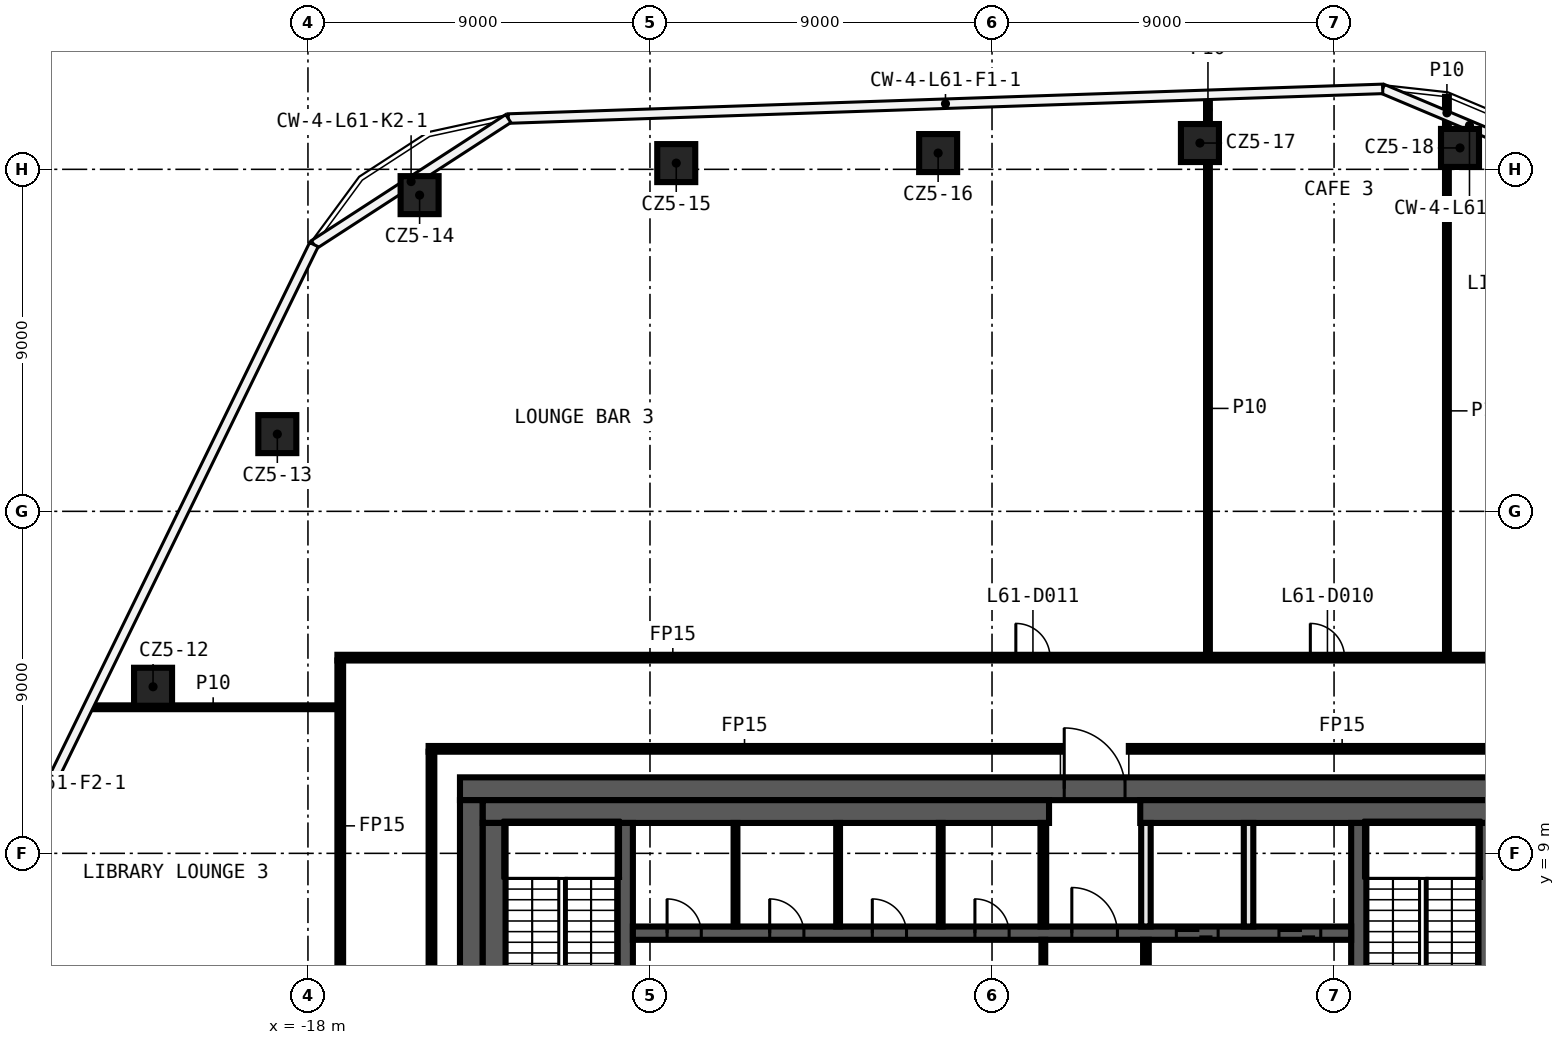
"""IFC4 building model, lengths in metres.
Left out: names, types, materials, properties, quantities, classifications, styles, units other than length and angle.
Written with IfcOpenShell. Run it as: python <this file> out.ifc"""

import sys

from ifc_helpers import new_model, si_unit, direction, frame, frame_2d, origin, origin_2d, place, context, subcontext, project, spatial, rectangle, extrude, element, fill, save


model = new_model("IFC4")
c1 = context("Model", 3, precision=1e-05, world=origin(), true_north=direction((0.0, 1.0)))
c2 = subcontext(c1, "Body", "Model", "MODEL_VIEW")
j1 = project(units=[si_unit("LENGTHUNIT", "METRE"), si_unit("PLANEANGLEUNIT", "RADIAN")], contexts=[c1])
p1 = place(None, origin())
s1 = spatial("IfcSite", under=j1, at=p1, CompositionType="ELEMENT")
p2 = place(p1, origin())
s2 = spatial("IfcBuilding", under=s1, at=p2, CompositionType="ELEMENT")
p3 = place(p2, frame((0.0, 0.0, 289.2)))
s3 = spatial("IfcBuildingStorey", under=s2, at=p3, CompositionType="ELEMENT", Elevation=289.2)
for number, where, z_axis, x_axis in (
    (1, (-22.076, 13.384, 0.0), (0.0, 0.0, 1.0), (1.0, 0.0, 0.0)),
    (2, (-18.806, 20.032, 0.0), (0.0, 0.0, 1.0), (1.0, 0.0, 0.0)),
    (3, (-15.062, 26.321, 0.0), (0.0, 0.0, 1.0), (1.0, 0.0, 0.0)),
    (4, (-8.309, 27.164, 0.0), (0.0, 0.0, 1.0), (1.0, 0.0, 0.0)),
    (5, (-1.418, 27.428, 0.0), (0.0, 0.0, 1.0), (1.0, 0.0, 0.0)),
    (6, (5.471, 27.692, 0.0), (0.0, 0.0, 1.0), (1.0, 0.0, 0.0)),
    (7, (12.314, 27.563, 0.0), (0.0, 0.0, 1.0), (1.0, 0.0, 0.0)),
):
    element("IfcColumn", number, at=place(p3, frame(where, z_axis=z_axis, x_axis=x_axis)), inside=s3, PredefinedType="COLUMN", context=c2, shape_type="SweptSolid", body=[
        extrude(rectangle(XDim=1.0, YDim=1.0, at=origin_2d()), origin(), (0.0, 0.0, 1.0), 4.62),
    ])
p4 = place(p3, frame((-14.825, 11.75, 0.0), z_axis=(0.0, 0.0, 1.0), x_axis=(1.0, 0.0, 0.0)))
e8 = element("IfcWall", 8, at=p4, inside=s3, PredefinedType="PARTITIONING", context=c2, shape_type="SweptSolid", body=[
    extrude(rectangle(XDim=16.625, YDim=0.15, at=frame_2d((8.312, 0.0))), origin(), (0.0, 0.0, 1.0), 4.62),
])
p5 = place(p3, frame((3.6, 11.75, 0.0), z_axis=(0.0, 0.0, 1.0), x_axis=(1.0, 0.0, 0.0)))
e9 = element("IfcWall", 9, at=p5, inside=s3, PredefinedType="PARTITIONING", context=c2, shape_type="SweptSolid", body=[
    extrude(rectangle(XDim=11.225, YDim=0.15, at=frame_2d((5.612, 0.0))), origin(), (0.0, 0.0, 1.0), 4.62),
])
p6 = place(p3, frame((-23.763, 12.844, 0.0), z_axis=(0.0, 0.0, 1.0), x_axis=(1.0, 0.0, 0.0)))
e10 = element("IfcWall", 10, at=p6, inside=s3, PredefinedType="PARTITIONING", context=c2, shape_type="SweptSolid", body=[
    extrude(rectangle(XDim=6.538, YDim=0.1, at=frame_2d((3.269, 0.0))), origin(), (0.0, 0.0, 1.0), 4.62),
])
p7 = place(p3, frame((-17.225, 14.15, 0.0), z_axis=(0.0, 0.0, 1.0), x_axis=(1.0, 0.0, 0.0)))
e11 = element("IfcWall", 11, at=p7, inside=s3, PredefinedType="PARTITIONING", context=c2, shape_type="SweptSolid", body=[
    extrude(rectangle(XDim=34.45, YDim=0.15, at=frame_2d((17.225, 0.0))), origin(), (0.0, 0.0, 1.0), 4.62),
])
p8 = place(p7, frame((31.335, 0.0, 0.0)))
e12 = element("IfcOpeningElement", 12, at=p8, cuts=e11, PredefinedType="OPENING", context=c2, shape_type="SweptSolid", body=[
    extrude(rectangle(XDim=0.9, YDim=2.1, at=frame_2d((0.45, 1.05))), frame((0.0, 0.085, 0.0), z_axis=(0.0, -1.0, 0.0), x_axis=(1.0, 0.0, 0.0)), (0.0, 0.0, 1.0), 0.17),
])
p9 = place(p7, frame((25.601, 0.0, 0.0)))
e13 = element("IfcOpeningElement", 13, at=p9, cuts=e11, PredefinedType="OPENING", context=c2, shape_type="SweptSolid", body=[
    extrude(rectangle(XDim=0.9, YDim=2.1, at=frame_2d((0.45, 1.05))), frame((0.0, 0.085, 0.0), z_axis=(0.0, -1.0, 0.0), x_axis=(1.0, 0.0, 0.0)), (0.0, 0.0, 1.0), 0.17),
])
p10 = place(p7, frame((17.852, 0.0, 0.0)))
e14 = element("IfcOpeningElement", 14, at=p10, cuts=e11, PredefinedType="OPENING", context=c2, shape_type="SweptSolid", body=[
    extrude(rectangle(XDim=0.9, YDim=2.1, at=frame_2d((0.45, 1.05))), frame((0.0, 0.085, 0.0), z_axis=(0.0, -1.0, 0.0), x_axis=(1.0, 0.0, 0.0)), (0.0, 0.0, 1.0), 0.17),
])
p11 = place(p3, frame((11.97, 14.225, 0.0), z_axis=(0.0, 0.0, 1.0), x_axis=(0.0, 1.0, 0.0)))
e15 = element("IfcWall", 15, at=p11, inside=s3, PredefinedType="PARTITIONING", context=c2, shape_type="SweptSolid", body=[
    extrude(rectangle(XDim=12.838, YDim=0.1, at=frame_2d((6.419, 0.0))), origin(), (0.0, 0.0, 1.0), 4.62),
])
p12 = place(p3, frame((11.97, 28.063, 0.0), z_axis=(0.0, 0.0, 1.0), x_axis=(0.0, 1.0, 0.0)))
e16 = element("IfcWall", 16, at=p12, inside=s3, PredefinedType="PARTITIONING", context=c2, shape_type="SweptSolid", body=[
    extrude(rectangle(XDim=0.845, YDim=0.1, at=frame_2d((0.423, 0.0))), origin(), (0.0, 0.0, 1.0), 4.62),
])
p13 = place(p3, frame((5.682, 14.225, 0.0), z_axis=(0.0, 0.0, 1.0), x_axis=(0.0, 1.0, 0.0)))
e17 = element("IfcWall", 17, at=p13, inside=s3, PredefinedType="PARTITIONING", context=c2, shape_type="SweptSolid", body=[
    extrude(rectangle(XDim=12.967, YDim=0.1, at=frame_2d((6.483, 0.0))), origin(), (0.0, 0.0, 1.0), 4.62),
])
p14 = place(p3, frame((5.682, 28.192, 0.0), z_axis=(0.0, 0.0, 1.0), x_axis=(0.0, 1.0, 0.0)))
e18 = element("IfcWall", 18, at=p14, inside=s3, PredefinedType="PARTITIONING", context=c2, shape_type="SweptSolid", body=[
    extrude(rectangle(XDim=0.749, YDim=0.1, at=frame_2d((0.375, 0.0))), origin(), (0.0, 0.0, 1.0), 4.62),
])
p15 = place(p3, frame((-14.75, 11.675, 0.0), z_axis=(0.0, 0.0, 1.0), x_axis=(0.0, -1.0, 0.0)))
e19 = element("IfcWall", 19, at=p15, inside=s3, PredefinedType="PARTITIONING", context=c2, shape_type="SweptSolid", body=[
    extrude(rectangle(XDim=23.35, YDim=0.15, at=frame_2d((11.675, 0.0))), origin(), (0.0, 0.0, 1.0), 4.62),
])
p16 = place(p15, frame((11.225, 0.0, 0.0)))
e20 = element("IfcOpeningElement", 20, at=p16, cuts=e19, PredefinedType="OPENING", context=c2, shape_type="SweptSolid", body=[
    extrude(rectangle(XDim=0.9, YDim=2.1, at=frame_2d((0.45, 1.05))), frame((0.0, 0.085, 0.0), z_axis=(0.0, -1.0, 0.0), x_axis=(1.0, 0.0, 0.0)), (0.0, 0.0, 1.0), 0.17),
])
p17 = place(p3, frame((-17.15, -14.075, 0.0), z_axis=(0.0, 0.0, 1.0), x_axis=(0.0, 1.0, 0.0)))
e21 = element("IfcWall", 21, at=p17, inside=s3, PredefinedType="PARTITIONING", context=c2, shape_type="SweptSolid", body=[
    extrude(rectangle(XDim=28.15, YDim=0.15, at=frame_2d((14.075, 0.0))), origin(), (0.0, 0.0, 1.0), 4.62),
])
p18 = place(p17, frame((11.094, 0.0, 0.0)))
e22 = element("IfcOpeningElement", 22, at=p18, cuts=e21, PredefinedType="OPENING", context=c2, shape_type="SweptSolid", body=[
    extrude(rectangle(XDim=0.9, YDim=2.1, at=frame_2d((0.45, 1.05))), frame((0.0, 0.085, 0.0), z_axis=(0.0, -1.0, 0.0), x_axis=(1.0, 0.0, 0.0)), (0.0, 0.0, 1.0), 0.17),
])
p19 = place(p17, frame((4.049, 0.0, 0.0)))
e23 = element("IfcOpeningElement", 23, at=p19, cuts=e21, PredefinedType="OPENING", context=c2, shape_type="SweptSolid", body=[
    extrude(rectangle(XDim=0.9, YDim=2.1, at=frame_2d((0.45, 1.05))), frame((0.0, 0.085, 0.0), z_axis=(0.0, -1.0, 0.0), x_axis=(1.0, 0.0, 0.0)), (0.0, 0.0, 1.0), 0.17),
])
p20 = place(p17, frame((18.347, 0.0, 0.0)))
e24 = element("IfcOpeningElement", 24, at=p20, cuts=e21, PredefinedType="OPENING", context=c2, shape_type="SweptSolid", body=[
    extrude(rectangle(XDim=0.9, YDim=2.1, at=frame_2d((0.45, 1.05))), frame((0.0, 0.085, 0.0), z_axis=(0.0, -1.0, 0.0), x_axis=(1.0, 0.0, 0.0)), (0.0, 0.0, 1.0), 0.17),
])
p21 = place(p3, frame((-14.0, 10.7, 0.0), z_axis=(0.0, 0.0, 1.0), x_axis=(1.0, 0.0, 0.0)))
e25 = element("IfcWall", 25, at=p21, inside=s3, PredefinedType="SHEAR", context=c2, shape_type="SweptSolid", body=[
    extrude(rectangle(XDim=28.0, YDim=0.6, at=frame_2d((14.0, 0.0))), origin(), (0.0, 0.0, 1.0), 4.62),
])
p22 = place(p21, frame((15.9, 0.0, 0.0)))
e26 = element("IfcOpeningElement", 26, at=p22, cuts=e25, PredefinedType="OPENING", context=c2, shape_type="SweptSolid", body=[
    extrude(rectangle(XDim=1.6, YDim=2.1, at=frame_2d((0.8, 1.05))), frame((0.0, 0.31, 0.0), z_axis=(0.0, -1.0, 0.0), x_axis=(1.0, 0.0, 0.0)), (0.0, 0.0, 1.0), 0.62),
])
p23 = place(p3, frame((-13.7, -10.4, 0.0), z_axis=(0.0, 0.0, 1.0), x_axis=(0.0, 1.0, 0.0)))
e27 = element("IfcWall", 27, at=p23, inside=s3, PredefinedType="SHEAR", context=c2, shape_type="SweptSolid", body=[
    extrude(rectangle(XDim=20.8, YDim=0.6, at=frame_2d((10.4, 0.0))), origin(), (0.0, 0.0, 1.0), 4.62),
])
p24 = place(p3, frame((-13.4, 10.1, 0.0), z_axis=(0.0, 0.0, 1.0), x_axis=(1.0, 0.0, 0.0)))
e28 = element("IfcWall", 28, at=p24, inside=s3, PredefinedType="SHEAR", context=c2, shape_type="SweptSolid", body=[
    extrude(rectangle(XDim=14.9, YDim=0.6, at=frame_2d((7.45, 0.0))), origin(), (0.0, 0.0, 1.0), 4.62),
])
p25 = place(p3, frame((3.9, 10.1, 0.0), z_axis=(0.0, 0.0, 1.0), x_axis=(1.0, 0.0, 0.0)))
e29 = element("IfcWall", 29, at=p25, inside=s3, PredefinedType="SHEAR", context=c2, shape_type="SweptSolid", body=[
    extrude(rectangle(XDim=9.5, YDim=0.6, at=frame_2d((4.75, 0.0))), origin(), (0.0, 0.0, 1.0), 4.62),
])
for number, where, z_axis, x_axis in (
    (30, (13.1, 9.8, 0.0), (0.0, 0.0, 1.0), (0.0, -1.0, 0.0)),
    (31, (-13.1, -9.8, 0.0), (0.0, 0.0, 1.0), (0.0, 1.0, 0.0)),
):
    element("IfcWall", number, at=place(p3, frame(where, z_axis=z_axis, x_axis=x_axis)), inside=s3, PredefinedType="SHEAR", context=c2, shape_type="SweptSolid", body=[
        extrude(rectangle(XDim=19.6, YDim=0.6, at=frame_2d((9.8, 0.0))), origin(), (0.0, 0.0, 1.0), 4.62),
    ])
p26 = place(p3, frame((9.65, 9.8, 0.0), z_axis=(0.0, 0.0, 1.0), x_axis=(0.0, -1.0, 0.0)))
e32 = element("IfcWall", 32, at=p26, inside=s3, PredefinedType="SHEAR", context=c2, shape_type="SweptSolid", body=[
    extrude(rectangle(XDim=7.5, YDim=0.4, at=frame_2d((3.75, 0.0))), origin(), (0.0, 0.0, 1.0), 4.62),
])
p27 = place(p26, frame((5.1, 0.0, 0.0)))
e33 = element("IfcOpeningElement", 33, at=p27, cuts=e32, PredefinedType="OPENING", context=c2, shape_type="SweptSolid", body=[
    extrude(rectangle(XDim=1.2, YDim=2.1, at=frame_2d((0.6, 1.05))), frame((0.0, 0.21, 0.0), z_axis=(0.0, -1.0, 0.0), x_axis=(1.0, 0.0, 0.0)), (0.0, 0.0, 1.0), 0.42),
])
p28 = place(p3, frame((-9.65, 2.3, 0.0), z_axis=(0.0, 0.0, 1.0), x_axis=(0.0, 1.0, 0.0)))
e34 = element("IfcWall", 34, at=p28, inside=s3, PredefinedType="SHEAR", context=c2, shape_type="SweptSolid", body=[
    extrude(rectangle(XDim=7.5, YDim=0.4, at=frame_2d((3.75, 0.0))), origin(), (0.0, 0.0, 1.0), 4.62),
])
p29 = place(p28, frame((1.2, 0.0, 0.0)))
e35 = element("IfcOpeningElement", 35, at=p29, cuts=e34, PredefinedType="OPENING", context=c2, shape_type="SweptSolid", body=[
    extrude(rectangle(XDim=1.2, YDim=2.1, at=frame_2d((0.6, 1.05))), frame((0.0, 0.21, 0.0), z_axis=(0.0, -1.0, 0.0), x_axis=(1.0, 0.0, 0.0)), (0.0, 0.0, 1.0), 0.42),
])
p30 = place(p3, frame((-9.45, 6.9, 0.0), z_axis=(0.0, 0.0, 1.0), x_axis=(1.0, 0.0, 0.0)))
e36 = element("IfcWall", 36, at=p30, inside=s3, PredefinedType="SHEAR", context=c2, shape_type="SweptSolid", body=[
    extrude(rectangle(XDim=18.9, YDim=0.35, at=frame_2d((9.45, 0.0))), origin(), (0.0, 0.0, 1.0), 4.62),
])
p31 = place(p30, frame((11.55, 0.0, 0.0)))
e37 = element("IfcOpeningElement", 37, at=p31, cuts=e36, PredefinedType="OPENING", context=c2, shape_type="SweptSolid", body=[
    extrude(rectangle(XDim=1.2, YDim=2.1, at=frame_2d((0.6, 1.05))), frame((0.0, 0.185, 0.0), z_axis=(0.0, -1.0, 0.0), x_axis=(1.0, 0.0, 0.0)), (0.0, 0.0, 1.0), 0.37),
])
p32 = place(p30, frame((14.3, 0.0, 0.0)))
e38 = element("IfcOpeningElement", 38, at=p32, cuts=e36, PredefinedType="OPENING", context=c2, shape_type="SweptSolid", body=[
    extrude(rectangle(XDim=1.1, YDim=2.1, at=frame_2d((0.55, 1.05))), frame((0.0, 0.185, 0.0), z_axis=(0.0, -1.0, 0.0), x_axis=(1.0, 0.0, 0.0)), (0.0, 0.0, 1.0), 0.37),
])
p33 = place(p30, frame((17.0, 0.0, 0.0)))
e39 = element("IfcOpeningElement", 39, at=p33, cuts=e36, PredefinedType="OPENING", context=c2, shape_type="SweptSolid", body=[
    extrude(rectangle(XDim=1.1, YDim=2.1, at=frame_2d((0.55, 1.05))), frame((0.0, 0.185, 0.0), z_axis=(0.0, -1.0, 0.0), x_axis=(1.0, 0.0, 0.0)), (0.0, 0.0, 1.0), 0.37),
])
p34 = place(p30, frame((0.9, 0.0, 0.0)))
e40 = element("IfcOpeningElement", 40, at=p34, cuts=e36, PredefinedType="OPENING", context=c2, shape_type="SweptSolid", body=[
    extrude(rectangle(XDim=0.9, YDim=2.1, at=frame_2d((0.45, 1.05))), frame((0.0, 0.185, 0.0), z_axis=(0.0, -1.0, 0.0), x_axis=(1.0, 0.0, 0.0)), (0.0, 0.0, 1.0), 0.37),
])
p35 = place(p30, frame((3.6, 0.0, 0.0)))
e41 = element("IfcOpeningElement", 41, at=p35, cuts=e36, PredefinedType="OPENING", context=c2, shape_type="SweptSolid", body=[
    extrude(rectangle(XDim=0.9, YDim=2.1, at=frame_2d((0.45, 1.05))), frame((0.0, 0.185, 0.0), z_axis=(0.0, -1.0, 0.0), x_axis=(1.0, 0.0, 0.0)), (0.0, 0.0, 1.0), 0.37),
])
p36 = place(p30, frame((6.3, 0.0, 0.0)))
e42 = element("IfcOpeningElement", 42, at=p36, cuts=e36, PredefinedType="OPENING", context=c2, shape_type="SweptSolid", body=[
    extrude(rectangle(XDim=0.9, YDim=2.1, at=frame_2d((0.45, 1.05))), frame((0.0, 0.185, 0.0), z_axis=(0.0, -1.0, 0.0), x_axis=(1.0, 0.0, 0.0)), (0.0, 0.0, 1.0), 0.37),
])
p37 = place(p30, frame((9.0, 0.0, 0.0)))
e43 = element("IfcOpeningElement", 43, at=p37, cuts=e36, PredefinedType="OPENING", context=c2, shape_type="SweptSolid", body=[
    extrude(rectangle(XDim=0.9, YDim=2.1, at=frame_2d((0.45, 1.05))), frame((0.0, 0.185, 0.0), z_axis=(0.0, -1.0, 0.0), x_axis=(1.0, 0.0, 0.0)), (0.0, 0.0, 1.0), 0.37),
])
p38 = place(p3, frame((6.75, 7.075, 0.0), z_axis=(0.0, 0.0, 1.0), x_axis=(0.0, 1.0, 0.0)))
e44 = element("IfcWall", 44, at=p38, inside=s3, PredefinedType="SOLIDWALL", context=c2, shape_type="SweptSolid", body=[
    extrude(rectangle(XDim=2.725, YDim=0.25, at=frame_2d((1.363, 0.0))), origin(), (0.0, 0.0, 1.0), 4.62),
])
p39 = place(p3, frame((4.05, 6.725, 0.0), z_axis=(0.0, 0.0, 1.0), x_axis=(0.0, -1.0, 0.0)))
e45 = element("IfcWall", 45, at=p39, inside=s3, PredefinedType="PARTITIONING", context=c2, shape_type="SweptSolid", body=[
    extrude(rectangle(XDim=3.25, YDim=0.15, at=frame_2d((1.625, 0.0))), origin(), (0.0, 0.0, 1.0), 4.62),
])
p40 = place(p39, frame((1.025, 0.0, 0.0)))
e46 = element("IfcOpeningElement", 46, at=p40, cuts=e45, PredefinedType="OPENING", context=c2, shape_type="SweptSolid", body=[
    extrude(rectangle(XDim=1.2, YDim=2.1, at=frame_2d((0.6, 1.05))), frame((0.0, 0.085, 0.0), z_axis=(0.0, -1.0, 0.0), x_axis=(1.0, 0.0, 0.0)), (0.0, 0.0, 1.0), 0.17),
])
p41 = place(p3, frame((4.05, 7.075, 0.0), z_axis=(0.0, 0.0, 1.0), x_axis=(0.0, 1.0, 0.0)))
e47 = element("IfcWall", 47, at=p41, inside=s3, PredefinedType="SOLIDWALL", context=c2, shape_type="SweptSolid", body=[
    extrude(rectangle(XDim=2.725, YDim=0.25, at=frame_2d((1.363, 0.0))), origin(), (0.0, 0.0, 1.0), 4.62),
])
p42 = place(p3, frame((1.35, 7.075, 0.0), z_axis=(0.0, 0.0, 1.0), x_axis=(0.0, 1.0, 0.0)))
e48 = element("IfcWall", 48, at=p42, inside=s3, PredefinedType="PARTITIONING", context=c2, shape_type="SweptSolid", body=[
    extrude(rectangle(XDim=2.725, YDim=0.15, at=frame_2d((1.363, 0.0))), origin(), (0.0, 0.0, 1.0), 4.62),
])
p43 = place(p3, frame((1.35, 6.725, 0.0), z_axis=(0.0, 0.0, 1.0), x_axis=(0.0, -1.0, 0.0)))
e49 = element("IfcWall", 49, at=p43, inside=s3, PredefinedType="PARTITIONING", context=c2, shape_type="SweptSolid", body=[
    extrude(rectangle(XDim=3.25, YDim=0.1, at=frame_2d((1.625, 0.0))), origin(), (0.0, 0.0, 1.0), 4.62),
])
p44 = place(p43, frame((1.025, 0.0, 0.0)))
e50 = element("IfcOpeningElement", 50, at=p44, cuts=e49, PredefinedType="OPENING", context=c2, shape_type="SweptSolid", body=[
    extrude(rectangle(XDim=1.2, YDim=2.1, at=frame_2d((0.6, 1.05))), frame((0.0, 0.06, 0.0), z_axis=(0.0, -1.0, 0.0), x_axis=(1.0, 0.0, 0.0)), (0.0, 0.0, 1.0), 0.12),
])
for number, where, z_axis, x_axis in (
    (51, (-1.35, 7.075, 0.0), (0.0, 0.0, 1.0), (0.0, 1.0, 0.0)),
    (52, (-4.05, 7.075, 0.0), (0.0, 0.0, 1.0), (0.0, 1.0, 0.0)),
    (53, (-6.75, 7.075, 0.0), (0.0, 0.0, 1.0), (0.0, 1.0, 0.0)),
):
    element("IfcWall", number, at=place(p3, frame(where, z_axis=z_axis, x_axis=x_axis)), inside=s3, PredefinedType="PARTITIONING", context=c2, shape_type="SweptSolid", body=[
        extrude(rectangle(XDim=2.725, YDim=0.1, at=frame_2d((1.363, 0.0))), origin(), (0.0, 0.0, 1.0), 4.62),
    ])
p45 = place(p9, origin())
e54 = element("IfcDoor", 54, at=p45, inside=s3, OperationType="SINGLE_SWING_LEFT", PredefinedType="DOOR", context=c2, shape_type="SweptSolid", body=[
    extrude(rectangle(XDim=0.9, YDim=2.1, at=frame_2d((0.45, 1.05))), frame((0.0, 0.025, 0.0), z_axis=(0.0, -1.0, 0.0), x_axis=(1.0, 0.0, 0.0)), (0.0, 0.0, 1.0), 0.05),
])
fill(e13, e54)
p46 = place(p10, origin())
e55 = element("IfcDoor", 55, at=p46, inside=s3, OperationType="SINGLE_SWING_RIGHT", PredefinedType="DOOR", context=c2, shape_type="SweptSolid", body=[
    extrude(rectangle(XDim=0.9, YDim=2.1, at=frame_2d((0.45, 1.05))), frame((0.0, 0.025, 0.0), z_axis=(0.0, -1.0, 0.0), x_axis=(1.0, 0.0, 0.0)), (0.0, 0.0, 1.0), 0.05),
])
fill(e14, e55)
p47 = place(p22, origin())
e56 = element("IfcDoor", 56, at=p47, inside=s3, OperationType="DOUBLE_DOOR_SINGLE_SWING", PredefinedType="DOOR", context=c2, shape_type="SweptSolid", body=[
    extrude(rectangle(XDim=1.6, YDim=2.1, at=frame_2d((0.8, 1.05))), frame((0.0, 0.025, 0.0), z_axis=(0.0, -1.0, 0.0), x_axis=(1.0, 0.0, 0.0)), (0.0, 0.0, 1.0), 0.05),
])
fill(e26, e56)
p48 = place(p31, origin())
e57 = element("IfcDoor", 57, at=p48, inside=s3, OperationType="SINGLE_SWING_LEFT", PredefinedType="DOOR", context=c2, shape_type="SweptSolid", body=[
    extrude(rectangle(XDim=1.2, YDim=2.1, at=frame_2d((0.6, 1.05))), frame((0.0, 0.025, 0.0), z_axis=(0.0, -1.0, 0.0), x_axis=(1.0, 0.0, 0.0)), (0.0, 0.0, 1.0), 0.05),
])
fill(e37, e57)
p49 = place(p32, origin())
e58 = element("IfcDoor", 58, at=p49, inside=s3, OperationType="DOUBLE_DOOR_SLIDING", PredefinedType="DOOR", context=c2, shape_type="SweptSolid", body=[
    extrude(rectangle(XDim=1.1, YDim=2.1, at=frame_2d((0.55, 1.05))), frame((0.0, 0.025, 0.0), z_axis=(0.0, -1.0, 0.0), x_axis=(1.0, 0.0, 0.0)), (0.0, 0.0, 1.0), 0.05),
])
fill(e38, e58)
p50 = place(p33, origin())
e59 = element("IfcDoor", 59, at=p50, inside=s3, OperationType="DOUBLE_DOOR_SLIDING", PredefinedType="DOOR", context=c2, shape_type="SweptSolid", body=[
    extrude(rectangle(XDim=1.1, YDim=2.1, at=frame_2d((0.55, 1.05))), frame((0.0, 0.025, 0.0), z_axis=(0.0, -1.0, 0.0), x_axis=(1.0, 0.0, 0.0)), (0.0, 0.0, 1.0), 0.05),
])
fill(e39, e59)
p51 = place(p34, origin())
e60 = element("IfcDoor", 60, at=p51, inside=s3, OperationType="SINGLE_SWING_RIGHT", PredefinedType="DOOR", context=c2, shape_type="SweptSolid", body=[
    extrude(rectangle(XDim=0.9, YDim=2.1, at=frame_2d((0.45, 1.05))), frame((0.0, 0.025, 0.0), z_axis=(0.0, -1.0, 0.0), x_axis=(1.0, 0.0, 0.0)), (0.0, 0.0, 1.0), 0.05),
])
fill(e40, e60)
p52 = place(p35, origin())
e61 = element("IfcDoor", 61, at=p52, inside=s3, OperationType="SINGLE_SWING_LEFT", PredefinedType="DOOR", context=c2, shape_type="SweptSolid", body=[
    extrude(rectangle(XDim=0.9, YDim=2.1, at=frame_2d((0.45, 1.05))), frame((0.0, 0.025, 0.0), z_axis=(0.0, -1.0, 0.0), x_axis=(1.0, 0.0, 0.0)), (0.0, 0.0, 1.0), 0.05),
])
fill(e41, e61)
p53 = place(p36, origin())
e62 = element("IfcDoor", 62, at=p53, inside=s3, OperationType="SINGLE_SWING_RIGHT", PredefinedType="DOOR", context=c2, shape_type="SweptSolid", body=[
    extrude(rectangle(XDim=0.9, YDim=2.1, at=frame_2d((0.45, 1.05))), frame((0.0, 0.025, 0.0), z_axis=(0.0, -1.0, 0.0), x_axis=(1.0, 0.0, 0.0)), (0.0, 0.0, 1.0), 0.05),
])
fill(e42, e62)
p54 = place(p37, origin())
e63 = element("IfcDoor", 63, at=p54, inside=s3, OperationType="SINGLE_SWING_LEFT", PredefinedType="DOOR", context=c2, shape_type="SweptSolid", body=[
    extrude(rectangle(XDim=0.9, YDim=2.1, at=frame_2d((0.45, 1.05))), frame((0.0, 0.025, 0.0), z_axis=(0.0, -1.0, 0.0), x_axis=(1.0, 0.0, 0.0)), (0.0, 0.0, 1.0), 0.05),
])
fill(e43, e63)
save(model, sys.argv[1])
